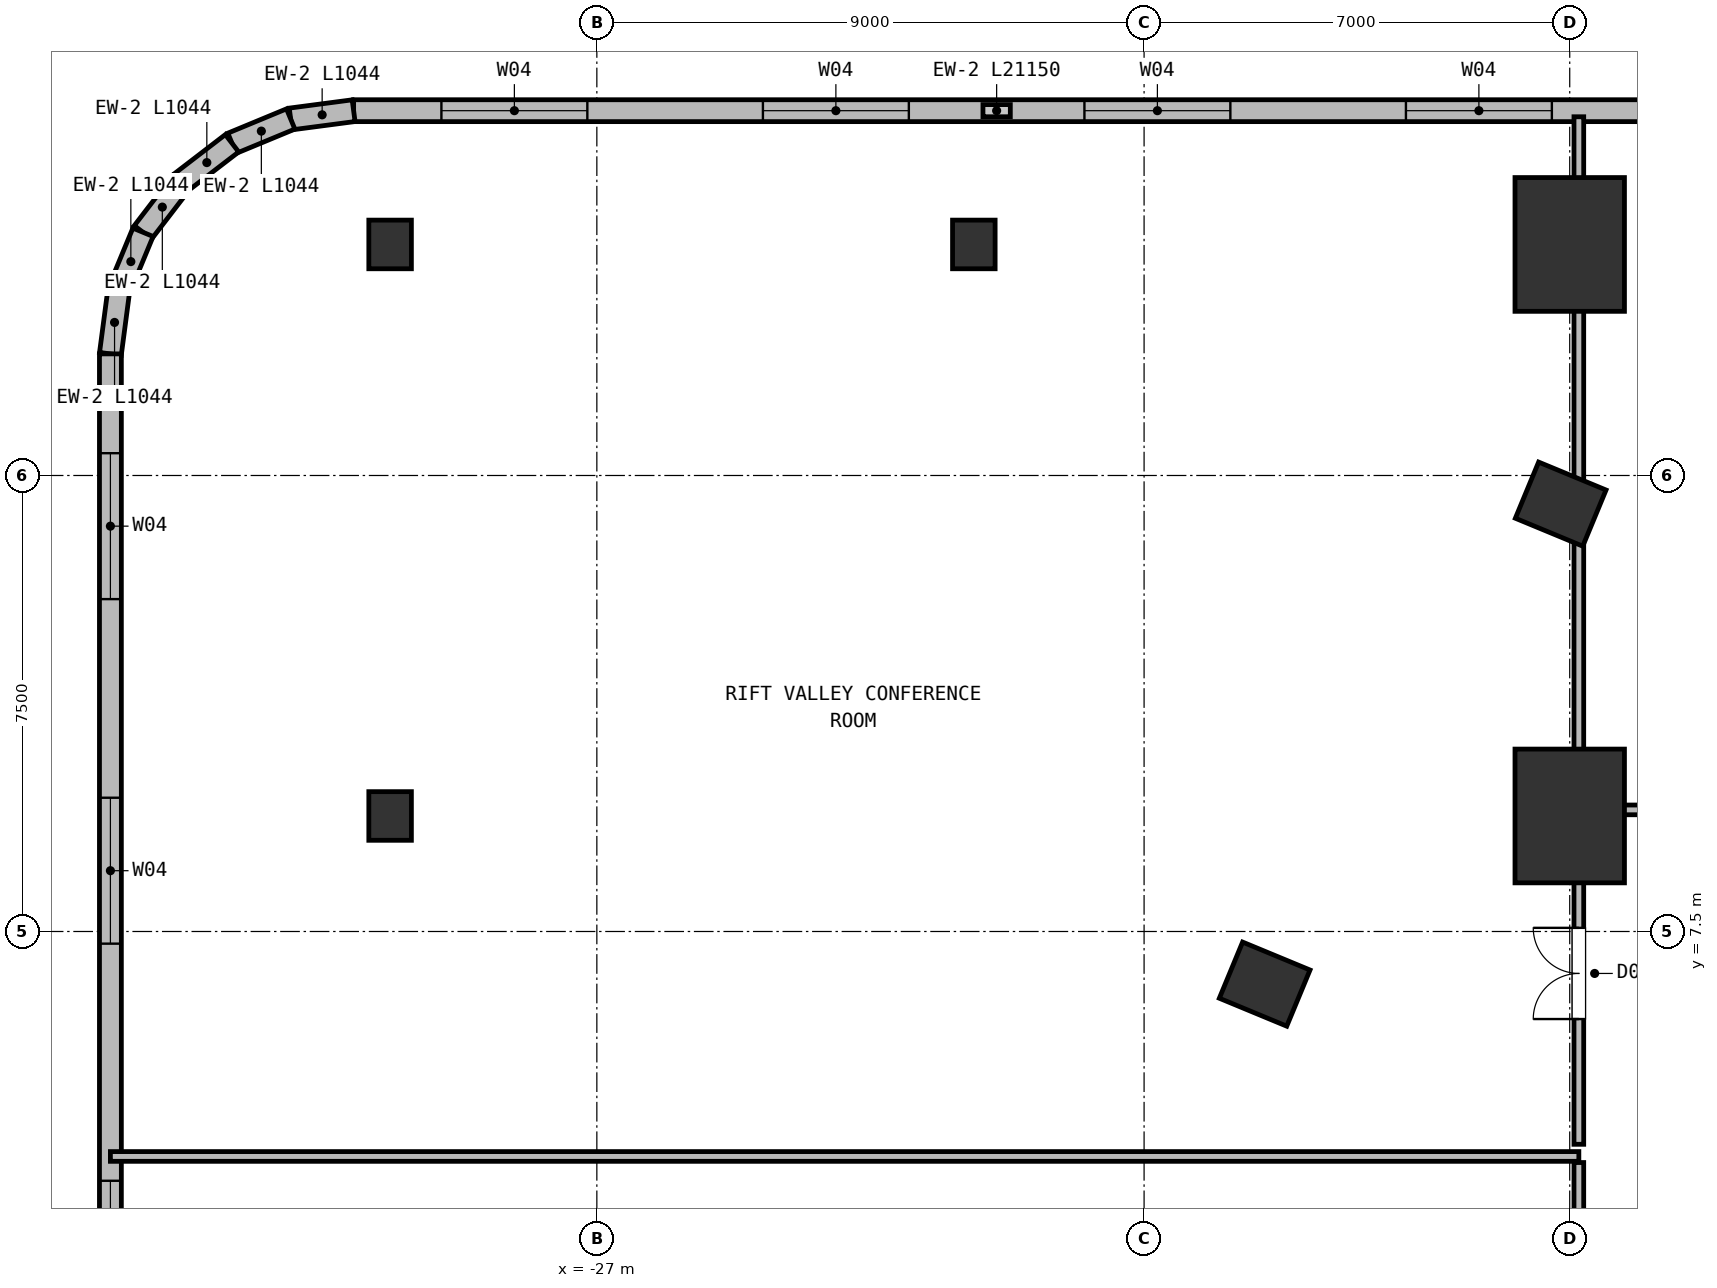
"""IFC4 building model, lengths in metres.
Left out: names, types, materials, properties, quantities, classifications, styles, units other than length and angle.
Written with IfcOpenShell. Run it as: python <this file> out.ifc"""

import sys

from ifc_helpers import new_model, si_unit, direction, frame, frame_2d, origin, origin_2d, place, context, subcontext, project, spatial, rectangle, extrude, element, fill, save


model = new_model("IFC4")
c1 = context("Model", 3, precision=1e-05, world=origin(), true_north=direction((0.0, 1.0)))
c2 = subcontext(c1, "Body", "Model", "MODEL_VIEW")
j1 = project(units=[si_unit("LENGTHUNIT", "METRE"), si_unit("PLANEANGLEUNIT", "RADIAN")], contexts=[c1])
p1 = place(None, origin())
s1 = spatial("IfcSite", under=j1, at=p1, CompositionType="ELEMENT")
p2 = place(p1, origin())
s2 = spatial("IfcBuilding", under=s1, at=p2, CompositionType="ELEMENT")
p3 = place(p2, frame((0.0, 0.0, 26.0)))
s3 = spatial("IfcBuildingStorey", under=s2, at=p3, CompositionType="ELEMENT", Elevation=26.0)
for number, where, z_axis, x_axis in (
    (1, (-11.148, 14.529, 0.0), (0.0, 0.0, 1.0), (0.383, 0.924, 0.0)),
    (2, (-16.017, 6.635, 0.0), (0.0, 0.0, 1.0), (0.383, 0.924, 0.0)),
):
    element("IfcColumn", number, at=place(p3, frame(where, z_axis=z_axis, x_axis=x_axis)), inside=s3, PredefinedType="COLUMN", context=c2, shape_type="SweptSolid", body=[
        extrude(rectangle(XDim=1.0, YDim=1.2, at=origin_2d()), origin(), (0.0, 0.0, 1.0), 4.5),
    ])
for number, where, z_axis, x_axis in (
    (3, (-30.4, 9.4, 0.0), (0.0, 0.0, 1.0), (1.0, 0.0, 0.0)),
    (4, (-30.4, 18.8, 0.0), (0.0, 0.0, 1.0), (1.0, 0.0, 0.0)),
    (5, (-20.8, 18.8, 0.0), (0.0, 0.0, 1.0), (1.0, 0.0, 0.0)),
):
    element("IfcColumn", number, at=place(p3, frame(where, z_axis=z_axis, x_axis=x_axis)), inside=s3, PredefinedType="COLUMN", context=c2, shape_type="SweptSolid", body=[
        extrude(rectangle(XDim=0.7, YDim=0.8, at=origin_2d()), origin(), (0.0, 0.0, 1.0), 4.5),
    ])
for number, where, z_axis, x_axis in (
    (6, (-11.0, 9.4, 0.0), (0.0, 0.0, 1.0), (1.0, 0.0, 0.0)),
    (7, (-11.0, 18.8, 0.0), (0.0, 0.0, 1.0), (1.0, 0.0, 0.0)),
):
    element("IfcColumn", number, at=place(p3, frame(where, z_axis=z_axis, x_axis=x_axis)), inside=s3, PredefinedType="COLUMN", context=c2, shape_type="SweptSolid", body=[
        extrude(rectangle(XDim=1.8, YDim=2.2, at=origin_2d()), origin(), (0.0, 0.0, 1.0), 4.5),
    ])
p4 = place(p3, frame((-31.0, 21.0, 0.0), z_axis=(0.0, 0.0, 1.0), x_axis=(1.0, 0.0, 0.0)))
e8 = element("IfcWall", 8, at=p4, inside=s3, PredefinedType="SOLIDWALL", context=c2, shape_type="SweptSolid", body=[
    extrude(rectangle(XDim=21.15, YDim=0.36, at=frame_2d((10.575, 0.0))), origin(), (0.0, 0.0, 1.0), 4.25),
])
p5 = place(p4, frame((1.444, 0.0, 0.95)))
e9 = element("IfcOpeningElement", 9, at=p5, cuts=e8, PredefinedType="OPENING", context=c2, shape_type="SweptSolid", body=[
    extrude(rectangle(XDim=2.4, YDim=2.6, at=frame_2d((1.2, 1.3))), frame((0.0, 0.19, 0.0), z_axis=(0.0, -1.0, 0.0), x_axis=(1.0, 0.0, 0.0)), (0.0, 0.0, 1.0), 0.38),
])
p6 = place(p4, frame((6.731, 0.0, 0.95)))
e10 = element("IfcOpeningElement", 10, at=p6, cuts=e8, PredefinedType="OPENING", context=c2, shape_type="SweptSolid", body=[
    extrude(rectangle(XDim=2.4, YDim=2.6, at=frame_2d((1.2, 1.3))), frame((0.0, 0.19, 0.0), z_axis=(0.0, -1.0, 0.0), x_axis=(1.0, 0.0, 0.0)), (0.0, 0.0, 1.0), 0.38),
])
p7 = place(p4, frame((12.019, 0.0, 0.95)))
e11 = element("IfcOpeningElement", 11, at=p7, cuts=e8, PredefinedType="OPENING", context=c2, shape_type="SweptSolid", body=[
    extrude(rectangle(XDim=2.4, YDim=2.6, at=frame_2d((1.2, 1.3))), frame((0.0, 0.19, 0.0), z_axis=(0.0, -1.0, 0.0), x_axis=(1.0, 0.0, 0.0)), (0.0, 0.0, 1.0), 0.38),
])
p8 = place(p4, frame((17.306, 0.0, 0.95)))
e12 = element("IfcOpeningElement", 12, at=p8, cuts=e8, PredefinedType="OPENING", context=c2, shape_type="SweptSolid", body=[
    extrude(rectangle(XDim=2.4, YDim=2.6, at=frame_2d((1.2, 1.3))), frame((0.0, 0.19, 0.0), z_axis=(0.0, -1.0, 0.0), x_axis=(1.0, 0.0, 0.0)), (0.0, 0.0, 1.0), 0.38),
])
p9 = place(p3, frame((-32.035, 20.864, 0.0), z_axis=(0.0, 0.0, 1.0), x_axis=(0.991455091231, 0.130448465198, 0.0)))
e13 = element("IfcWall", 13, at=p9, inside=s3, PredefinedType="SOLIDWALL", context=c2, shape_type="SweptSolid", body=[
    extrude(rectangle(XDim=1.044, YDim=0.36, at=frame_2d((0.522, 0.0))), origin(), (0.0, 0.0, 1.0), 4.25),
])
for number, where, z_axis, x_axis in (
    (14, (-33.0, 20.464, 0.0), (0.0, 0.0, 1.0), (0.924, 0.383, 0.0)),
    (15, (-33.828, 19.828, 0.0), (0.0, 0.0, 1.0), (0.793, 0.609, 0.0)),
    (16, (-34.464, 19.0, 0.0), (0.0, 0.0, 1.0), (0.609, 0.793, 0.0)),
    (17, (-34.864, 18.035, 0.0), (0.0, 0.0, 1.0), (0.383, 0.924, 0.0)),
):
    element("IfcWall", number, at=place(p3, frame(where, z_axis=z_axis, x_axis=x_axis)), inside=s3, PredefinedType="SOLIDWALL", context=c2, shape_type="SweptSolid", body=[
        extrude(rectangle(XDim=1.044, YDim=0.36, at=frame_2d((0.522, 0.0))), origin(), (0.0, 0.0, 1.0), 4.25),
    ])
p10 = place(p3, frame((-35.0, 17.0, 0.0), z_axis=(0.0, 0.0, 1.0), x_axis=(0.130448465198, 0.991455091231, 0.0)))
e18 = element("IfcWall", 18, at=p10, inside=s3, PredefinedType="SOLIDWALL", context=c2, shape_type="SweptSolid", body=[
    extrude(rectangle(XDim=1.044, YDim=0.36, at=frame_2d((0.522, 0.0))), origin(), (0.0, 0.0, 1.0), 4.25),
])
p11 = place(p3, frame((-35.0, -17.0, 0.0), z_axis=(0.0, 0.0, 1.0), x_axis=(0.0, 1.0, 0.0)))
e19 = element("IfcWall", 19, at=p11, inside=s3, PredefinedType="SOLIDWALL", context=c2, shape_type="SweptSolid", body=[
    extrude(rectangle(XDim=34.0, YDim=0.36, at=frame_2d((17.0, 0.0))), origin(), (0.0, 0.0, 1.0), 4.25),
])
p12 = place(p11, frame((1.633, 0.0, 0.95)))
e20 = element("IfcOpeningElement", 20, at=p12, cuts=e19, PredefinedType="OPENING", context=c2, shape_type="SweptSolid", body=[
    extrude(rectangle(XDim=2.4, YDim=2.6, at=frame_2d((1.2, 1.3))), frame((0.0, 0.19, 0.0), z_axis=(0.0, -1.0, 0.0), x_axis=(1.0, 0.0, 0.0)), (0.0, 0.0, 1.0), 0.38),
])
p13 = place(p11, frame((7.3, 0.0, 0.95)))
e21 = element("IfcOpeningElement", 21, at=p13, cuts=e19, PredefinedType="OPENING", context=c2, shape_type="SweptSolid", body=[
    extrude(rectangle(XDim=2.4, YDim=2.6, at=frame_2d((1.2, 1.3))), frame((0.0, 0.19, 0.0), z_axis=(0.0, -1.0, 0.0), x_axis=(1.0, 0.0, 0.0)), (0.0, 0.0, 1.0), 0.38),
])
p14 = place(p11, frame((12.967, 0.0, 0.95)))
e22 = element("IfcOpeningElement", 22, at=p14, cuts=e19, PredefinedType="OPENING", context=c2, shape_type="SweptSolid", body=[
    extrude(rectangle(XDim=2.4, YDim=2.6, at=frame_2d((1.2, 1.3))), frame((0.0, 0.19, 0.0), z_axis=(0.0, -1.0, 0.0), x_axis=(1.0, 0.0, 0.0)), (0.0, 0.0, 1.0), 0.38),
])
p15 = place(p11, frame((18.0, 0.0, 0.95)))
e23 = element("IfcOpeningElement", 23, at=p15, cuts=e19, PredefinedType="OPENING", context=c2, shape_type="SweptSolid", body=[
    extrude(rectangle(XDim=2.4, YDim=2.6, at=frame_2d((1.2, 1.3))), frame((0.0, 0.19, 0.0), z_axis=(0.0, -1.0, 0.0), x_axis=(1.0, 0.0, 0.0)), (0.0, 0.0, 1.0), 0.38),
])
p16 = place(p11, frame((24.3, 0.0, 0.95)))
e24 = element("IfcOpeningElement", 24, at=p16, cuts=e19, PredefinedType="OPENING", context=c2, shape_type="SweptSolid", body=[
    extrude(rectangle(XDim=2.4, YDim=2.6, at=frame_2d((1.2, 1.3))), frame((0.0, 0.19, 0.0), z_axis=(0.0, -1.0, 0.0), x_axis=(1.0, 0.0, 0.0)), (0.0, 0.0, 1.0), 0.38),
])
p17 = place(p11, frame((29.967, 0.0, 0.95)))
e25 = element("IfcOpeningElement", 25, at=p17, cuts=e19, PredefinedType="OPENING", context=c2, shape_type="SweptSolid", body=[
    extrude(rectangle(XDim=2.4, YDim=2.6, at=frame_2d((1.2, 1.3))), frame((0.0, 0.19, 0.0), z_axis=(0.0, -1.0, 0.0), x_axis=(1.0, 0.0, 0.0)), (0.0, 0.0, 1.0), 0.38),
])
p18 = place(p3, frame((-10.85, 3.8, 0.0), z_axis=(0.0, 0.0, 1.0), x_axis=(-1.0, 0.0, 0.0)))
e26 = element("IfcWall", 26, at=p18, inside=s3, PredefinedType="PARTITIONING", context=c2, shape_type="SweptSolid", body=[
    extrude(rectangle(XDim=24.15, YDim=0.16, at=frame_2d((12.075, 0.0))), origin(), (0.0, 0.0, 1.0), 4.25),
])
p19 = place(p3, frame((-10.85, -20.9, 0.0), z_axis=(0.0, 0.0, 1.0), x_axis=(0.0, 1.0, 0.0)))
e27 = element("IfcWall", 27, at=p19, inside=s3, PredefinedType="PARTITIONING", context=c2, shape_type="SweptSolid", body=[
    extrude(rectangle(XDim=24.6, YDim=0.16, at=frame_2d((12.3, 0.0))), origin(), (0.0, 0.0, 1.0), 3.62),
])
p20 = place(p19, frame((17.35, 0.0, 0.0)))
e28 = element("IfcOpeningElement", 28, at=p20, cuts=e27, PredefinedType="OPENING", context=c2, shape_type="SweptSolid", body=[
    extrude(rectangle(XDim=1.5, YDim=2.2, at=frame_2d((0.75, 1.1))), frame((0.0, 0.09, 0.0), z_axis=(0.0, -1.0, 0.0), x_axis=(1.0, 0.0, 0.0)), (0.0, 0.0, 1.0), 0.18),
])
p21 = place(p3, frame((-10.85, 4.0, 0.0), z_axis=(0.0, 0.0, 1.0), x_axis=(0.0, 1.0, 0.0)))
e29 = element("IfcWall", 29, at=p21, inside=s3, PredefinedType="PARTITIONING", context=c2, shape_type="SweptSolid", body=[
    extrude(rectangle(XDim=16.9, YDim=0.16, at=frame_2d((8.45, 0.0))), origin(), (0.0, 0.0, 1.0), 3.62),
])
p22 = place(p21, frame((2.06, 0.0, 0.0)))
e30 = element("IfcOpeningElement", 30, at=p22, cuts=e29, PredefinedType="OPENING", context=c2, shape_type="SweptSolid", body=[
    extrude(rectangle(XDim=1.5, YDim=2.2, at=frame_2d((0.75, 1.1))), frame((0.0, 0.09, 0.0), z_axis=(0.0, -1.0, 0.0), x_axis=(1.0, 0.0, 0.0)), (0.0, 0.0, 1.0), 0.18),
])
p23 = place(p3, frame((-10.75, 9.5, 0.0), z_axis=(0.0, 0.0, 1.0), x_axis=(1.0, 0.0, 0.0)))
e31 = element("IfcWall", 31, at=p23, inside=s3, PredefinedType="PARTITIONING", context=c2, shape_type="SweptSolid", body=[
    extrude(rectangle(XDim=19.5, YDim=0.16, at=frame_2d((9.75, 0.0))), origin(), (0.0, 0.0, 1.0), 3.33),
])
p24 = place(p23, frame((6.2, 0.0, 0.0)))
e32 = element("IfcOpeningElement", 32, at=p24, cuts=e31, PredefinedType="OPENING", context=c2, shape_type="SweptSolid", body=[
    extrude(rectangle(XDim=1.5, YDim=2.2, at=frame_2d((0.75, 1.1))), frame((0.0, 0.09, 0.0), z_axis=(0.0, -1.0, 0.0), x_axis=(1.0, 0.0, 0.0)), (0.0, 0.0, 1.0), 0.18),
])
p25 = place(p5, origin())
e33 = element("IfcWindow", 33, at=p25, inside=s3, PartitioningType="SINGLE_PANEL", PredefinedType="WINDOW", context=c2, shape_type="SweptSolid", body=[
    extrude(rectangle(XDim=2.4, YDim=2.6, at=frame_2d((1.2, 1.3))), frame((0.0, 0.03, 0.0), z_axis=(0.0, -1.0, 0.0), x_axis=(1.0, 0.0, 0.0)), (0.0, 0.0, 1.0), 0.06),
])
fill(e9, e33)
p26 = place(p6, origin())
e34 = element("IfcWindow", 34, at=p26, inside=s3, PartitioningType="SINGLE_PANEL", PredefinedType="WINDOW", context=c2, shape_type="SweptSolid", body=[
    extrude(rectangle(XDim=2.4, YDim=2.6, at=frame_2d((1.2, 1.3))), frame((0.0, 0.03, 0.0), z_axis=(0.0, -1.0, 0.0), x_axis=(1.0, 0.0, 0.0)), (0.0, 0.0, 1.0), 0.06),
])
fill(e10, e34)
p27 = place(p7, origin())
e35 = element("IfcWindow", 35, at=p27, inside=s3, PartitioningType="SINGLE_PANEL", PredefinedType="WINDOW", context=c2, shape_type="SweptSolid", body=[
    extrude(rectangle(XDim=2.4, YDim=2.6, at=frame_2d((1.2, 1.3))), frame((0.0, 0.03, 0.0), z_axis=(0.0, -1.0, 0.0), x_axis=(1.0, 0.0, 0.0)), (0.0, 0.0, 1.0), 0.06),
])
fill(e11, e35)
p28 = place(p8, origin())
e36 = element("IfcWindow", 36, at=p28, inside=s3, PartitioningType="SINGLE_PANEL", PredefinedType="WINDOW", context=c2, shape_type="SweptSolid", body=[
    extrude(rectangle(XDim=2.4, YDim=2.6, at=frame_2d((1.2, 1.3))), frame((0.0, 0.03, 0.0), z_axis=(0.0, -1.0, 0.0), x_axis=(1.0, 0.0, 0.0)), (0.0, 0.0, 1.0), 0.06),
])
fill(e12, e36)
p29 = place(p15, origin())
e37 = element("IfcWindow", 37, at=p29, inside=s3, PartitioningType="SINGLE_PANEL", PredefinedType="WINDOW", context=c2, shape_type="SweptSolid", body=[
    extrude(rectangle(XDim=2.4, YDim=2.6, at=frame_2d((1.2, 1.3))), frame((0.0, 0.03, 0.0), z_axis=(0.0, -1.0, 0.0), x_axis=(1.0, 0.0, 0.0)), (0.0, 0.0, 1.0), 0.06),
])
fill(e23, e37)
p30 = place(p16, origin())
e38 = element("IfcWindow", 38, at=p30, inside=s3, PartitioningType="SINGLE_PANEL", PredefinedType="WINDOW", context=c2, shape_type="SweptSolid", body=[
    extrude(rectangle(XDim=2.4, YDim=2.6, at=frame_2d((1.2, 1.3))), frame((0.0, 0.03, 0.0), z_axis=(0.0, -1.0, 0.0), x_axis=(1.0, 0.0, 0.0)), (0.0, 0.0, 1.0), 0.06),
])
fill(e24, e38)
p31 = place(p17, origin())
e39 = element("IfcWindow", 39, at=p31, inside=s3, PartitioningType="SINGLE_PANEL", PredefinedType="WINDOW", context=c2, shape_type="SweptSolid", body=[
    extrude(rectangle(XDim=2.4, YDim=2.6, at=frame_2d((1.2, 1.3))), frame((0.0, 0.03, 0.0), z_axis=(0.0, -1.0, 0.0), x_axis=(1.0, 0.0, 0.0)), (0.0, 0.0, 1.0), 0.06),
])
fill(e25, e39)
p32 = place(p22, origin())
e40 = element("IfcDoor", 40, at=p32, inside=s3, OperationType="DOUBLE_DOOR_SINGLE_SWING", PredefinedType="DOOR", context=c2, shape_type="SweptSolid", body=[
    extrude(rectangle(XDim=1.5, YDim=2.2, at=frame_2d((0.75, 1.1))), frame((0.0, 0.025, 0.0), z_axis=(0.0, -1.0, 0.0), x_axis=(1.0, 0.0, 0.0)), (0.0, 0.0, 1.0), 0.05),
])
fill(e30, e40)
save(model, sys.argv[1])
